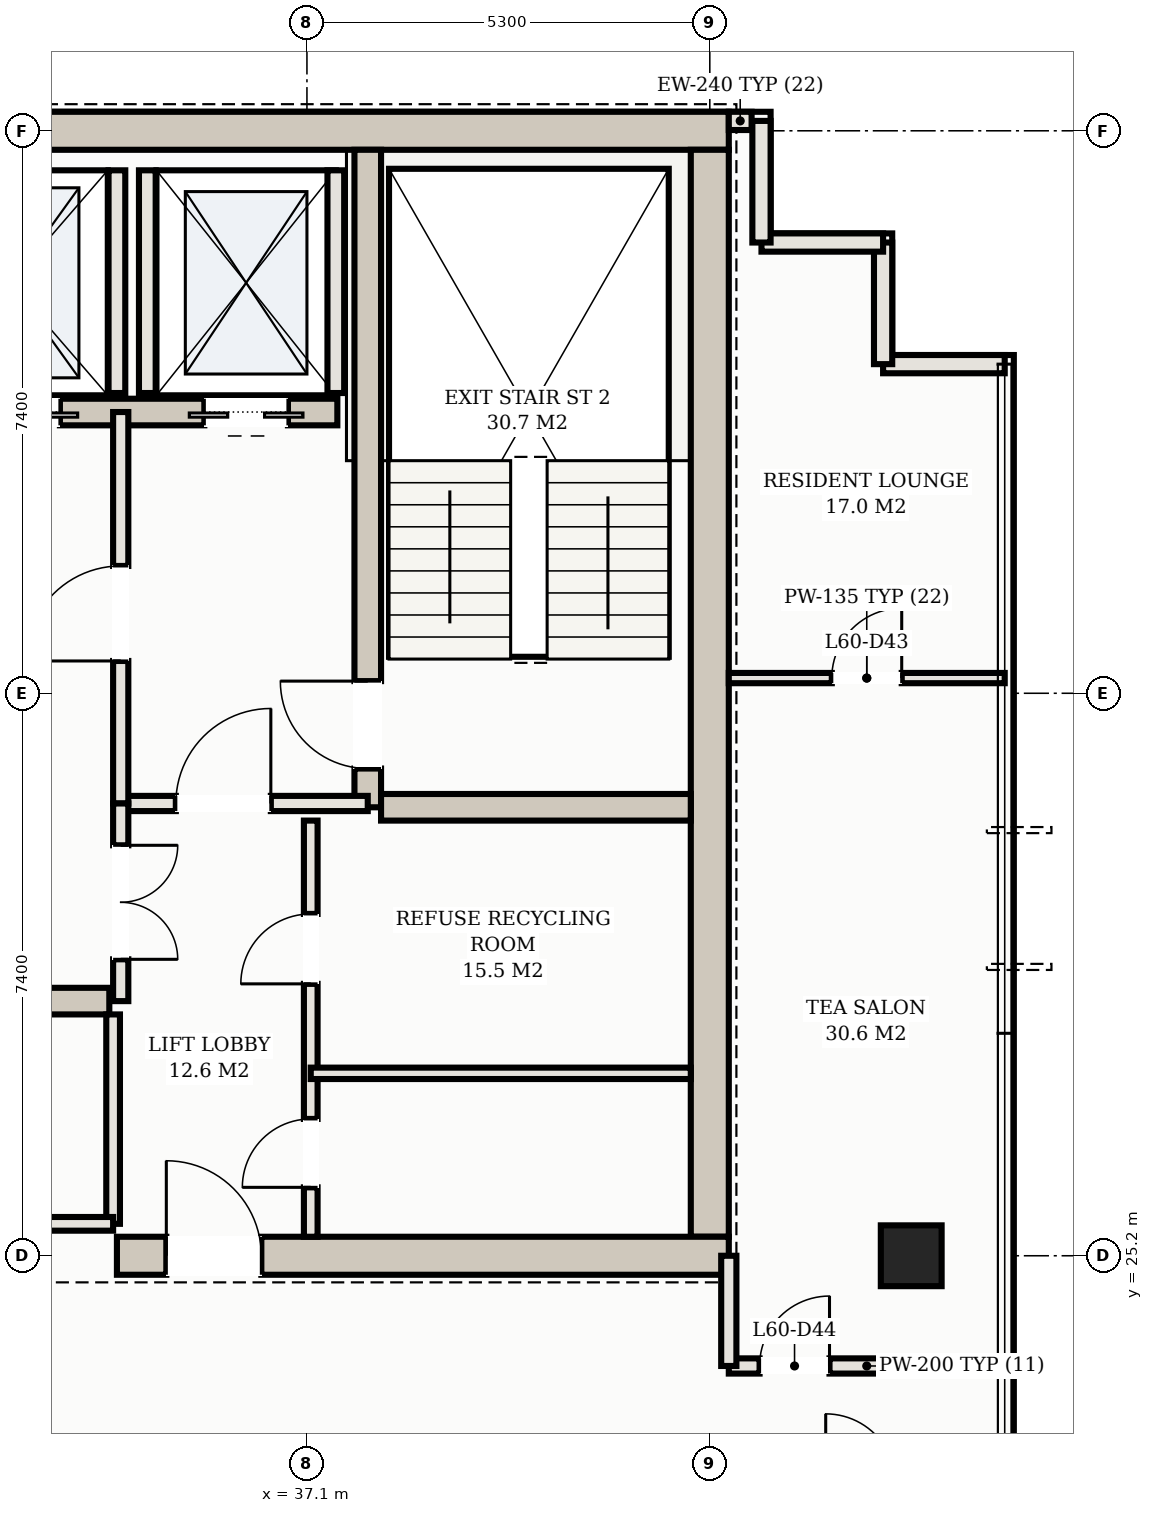
"""IFC4 building model, lengths in metres.
Left out: names, types, materials, properties, quantities, classifications, styles, units other than length and angle.
Written with IfcOpenShell. Run it as: python <this file> out.ifc"""

import sys

from ifc_helpers import new_model, si_unit, direction, frame, frame_2d, origin, origin_2d, place, context, subcontext, project, spatial, rectangle, hollow_rectangle, extrude, element, fill, save


model = new_model("IFC4")
c1 = context("Model", 3, precision=1e-05, world=origin(), true_north=direction((0.0, 1.0)))
c2 = subcontext(c1, "Body", "Model", "MODEL_VIEW")
j1 = project(units=[si_unit("LENGTHUNIT", "METRE"), si_unit("PLANEANGLEUNIT", "RADIAN")], contexts=[c1])
p1 = place(None, origin())
s1 = spatial("IfcSite", under=j1, at=p1, CompositionType="ELEMENT")
p2 = place(p1, origin())
s2 = spatial("IfcBuilding", under=s1, at=p2, CompositionType="ELEMENT")
p3 = place(p2, frame((0.0, 0.0, 219.8)))
s3 = spatial("IfcBuildingStorey", under=s2, at=p3, CompositionType="ELEMENT", Elevation=219.8)
p4 = place(p3, frame((10.35, 40.0, 0.0), z_axis=(0.0, 0.0, 1.0), x_axis=(1.0, 0.0, 0.0)))
e1 = element("IfcWall", 1, at=p4, inside=s3, PredefinedType="SHEAR", context=c2, shape_type="SweptSolid", body=[
    extrude(rectangle(XDim=32.3, YDim=0.5, at=frame_2d((16.15, 0.0))), origin(), (0.0, 0.0, 1.0), 3.11),
])
p5 = place(p3, frame((42.4, 25.45, 0.0), z_axis=(0.0, 0.0, 1.0), x_axis=(0.0, 1.0, 0.0)))
e2 = element("IfcWall", 2, at=p5, inside=s3, PredefinedType="SHEAR", context=c2, shape_type="SweptSolid", body=[
    extrude(rectangle(XDim=14.3, YDim=0.5, at=frame_2d((7.15, 0.0))), origin(), (0.0, 0.0, 1.0), 3.11),
])
p6 = place(p3, frame((34.6, 25.2, 0.0), z_axis=(0.0, 0.0, 1.0), x_axis=(1.0, 0.0, 0.0)))
e3 = element("IfcWall", 3, at=p6, inside=s3, PredefinedType="SHEAR", context=c2, shape_type="SweptSolid", body=[
    extrude(rectangle(XDim=8.05, YDim=0.5, at=frame_2d((4.025, 0.0))), origin(), (0.0, 0.0, 1.0), 3.11),
])
p7 = place(p6, frame((0.65, 0.0, 0.0)))
e4 = element("IfcOpeningElement", 4, at=p7, cuts=e3, PredefinedType="OPENING", context=c2, shape_type="SweptSolid", body=[
    extrude(rectangle(XDim=1.25, YDim=2.2, at=frame_2d((0.625, 1.1))), frame((0.0, 0.26, 0.0), z_axis=(0.0, -1.0, 0.0), x_axis=(1.0, 0.0, 0.0)), (0.0, 0.0, 1.0), 0.52),
])
p8 = place(p3, frame((37.9, 31.1, 0.0), z_axis=(0.0, 0.0, 1.0), x_axis=(0.0, 1.0, 0.0)))
e5 = element("IfcWall", 5, at=p8, inside=s3, PredefinedType="SHEAR", context=c2, shape_type="SweptSolid", body=[
    extrude(rectangle(XDim=8.65, YDim=0.35, at=frame_2d((4.325, 0.0))), origin(), (0.0, 0.0, 1.0), 3.11),
])
p9 = place(p8, frame((0.51, 0.0, 0.0)))
e6 = element("IfcOpeningElement", 6, at=p9, cuts=e5, PredefinedType="OPENING", context=c2, shape_type="SweptSolid", body=[
    extrude(rectangle(XDim=1.15, YDim=2.2, at=frame_2d((0.575, 1.1))), frame((0.0, 0.185, 0.0), z_axis=(0.0, -1.0, 0.0), x_axis=(1.0, 0.0, 0.0)), (0.0, 0.0, 1.0), 0.37),
])
p10 = place(p3, frame((38.075, 31.1, 0.0), z_axis=(0.0, 0.0, 1.0), x_axis=(1.0, 0.0, 0.0)))
e7 = element("IfcWall", 7, at=p10, inside=s3, PredefinedType="SHEAR", context=c2, shape_type="SweptSolid", body=[
    extrude(rectangle(XDim=4.075, YDim=0.35, at=frame_2d((2.038, 0.0))), origin(), (0.0, 0.0, 1.0), 3.11),
])
p11 = place(p3, frame((15.5, 36.3, 0.0), z_axis=(0.0, 0.0, 1.0), x_axis=(1.0, 0.0, 0.0)))
e8 = element("IfcWall", 8, at=p11, inside=s3, PredefinedType="SHEAR", context=c2, shape_type="SweptSolid", body=[
    extrude(rectangle(XDim=22.0, YDim=0.35, at=frame_2d((11.0, 0.0))), origin(), (0.0, 0.0, 1.0), 3.11),
])
p12 = place(p11, frame((0.65, 0.0, 0.0)))
e9 = element("IfcOpeningElement", 9, at=p12, cuts=e8, PredefinedType="OPENING", context=c2, shape_type="SweptSolid", body=[
    extrude(rectangle(XDim=1.1, YDim=2.15, at=frame_2d((0.55, 1.075))), frame((0.0, 0.185, 0.0), z_axis=(0.0, -1.0, 0.0), x_axis=(1.0, 0.0, 0.0)), (0.0, 0.0, 1.0), 0.37),
])
p13 = place(p11, frame((20.25, 0.0, 0.0)))
e10 = element("IfcOpeningElement", 10, at=p13, cuts=e8, PredefinedType="OPENING", context=c2, shape_type="SweptSolid", body=[
    extrude(rectangle(XDim=1.1, YDim=2.15, at=frame_2d((0.55, 1.075))), frame((0.0, 0.185, 0.0), z_axis=(0.0, -1.0, 0.0), x_axis=(1.0, 0.0, 0.0)), (0.0, 0.0, 1.0), 0.37),
])
p14 = place(p11, frame((17.05, 0.0, 0.0)))
e11 = element("IfcOpeningElement", 11, at=p14, cuts=e8, PredefinedType="OPENING", context=c2, shape_type="SweptSolid", body=[
    extrude(rectangle(XDim=1.3, YDim=2.2, at=frame_2d((0.65, 1.1))), frame((0.0, 0.185, 0.0), z_axis=(0.0, -1.0, 0.0), x_axis=(1.0, 0.0, 0.0)), (0.0, 0.0, 1.0), 0.37),
])
p15 = place(p11, frame((3.95, 0.0, 0.0)))
e12 = element("IfcOpeningElement", 12, at=p15, cuts=e8, PredefinedType="OPENING", context=c2, shape_type="SweptSolid", body=[
    extrude(rectangle(XDim=1.1, YDim=2.15, at=frame_2d((0.55, 1.075))), frame((0.0, 0.185, 0.0), z_axis=(0.0, -1.0, 0.0), x_axis=(1.0, 0.0, 0.0)), (0.0, 0.0, 1.0), 0.37),
])
p16 = place(p11, frame((6.55, 0.0, 0.0)))
e13 = element("IfcOpeningElement", 13, at=p16, cuts=e8, PredefinedType="OPENING", context=c2, shape_type="SweptSolid", body=[
    extrude(rectangle(XDim=1.1, YDim=2.15, at=frame_2d((0.55, 1.075))), frame((0.0, 0.185, 0.0), z_axis=(0.0, -1.0, 0.0), x_axis=(1.0, 0.0, 0.0)), (0.0, 0.0, 1.0), 0.37),
])
p17 = place(p11, frame((9.15, 0.0, 0.0)))
e14 = element("IfcOpeningElement", 14, at=p17, cuts=e8, PredefinedType="OPENING", context=c2, shape_type="SweptSolid", body=[
    extrude(rectangle(XDim=1.1, YDim=2.15, at=frame_2d((0.55, 1.075))), frame((0.0, 0.185, 0.0), z_axis=(0.0, -1.0, 0.0), x_axis=(1.0, 0.0, 0.0)), (0.0, 0.0, 1.0), 0.37),
])
p18 = place(p3, frame((18.5, 28.55, 0.0), z_axis=(0.0, 0.0, 1.0), x_axis=(1.0, 0.0, 0.0)))
e15 = element("IfcWall", 15, at=p18, inside=s3, PredefinedType="SHEAR", context=c2, shape_type="SweptSolid", body=[
    extrude(rectangle(XDim=16.0, YDim=0.35, at=frame_2d((8.0, 0.0))), origin(), (0.0, 0.0, 1.0), 3.11),
])
p19 = place(p3, frame((45.05, 25.2, 0.0), z_axis=(0.0, 0.0, 1.0), x_axis=(1.0, 0.0, 0.0)))
e16 = element("IfcColumn", 16, at=p19, inside=s3, PredefinedType="COLUMN", context=c2, shape_type="SweptSolid", body=[
    extrude(hollow_rectangle(XDim=0.8, YDim=0.8, WallThickness=0.028, at=origin_2d()), origin(), (0.0, 0.0, 1.0), 3.3),
])
for number, where, z_axis, x_axis in (
    (17, (35.0, 36.55, 0.0), (0.0, 0.0, 1.0), (0.0, 1.0, 0.0)),
    (18, (37.48, 36.55, 0.0), (0.0, 0.0, 1.0), (0.0, 1.0, 0.0)),
    (19, (34.6, 36.55, 0.0), (0.0, 0.0, 1.0), (0.0, 1.0, 0.0)),
):
    element("IfcWall", number, at=place(p3, frame(where, z_axis=z_axis, x_axis=x_axis)), inside=s3, PredefinedType="SOLIDWALL", context=c2, shape_type="SweptSolid", body=[
        extrude(rectangle(XDim=2.93, YDim=0.22, at=frame_2d((1.465, 0.0))), origin(), (0.0, 0.0, 1.0), 3.11),
    ])
for number, where, z_axis, x_axis in (
    (20, (46.28, 36.93, 0.0), (0.0, 0.0, 1.0), (-1.0, 0.0, 0.0)),
    (21, (44.68, 36.93, 0.0), (0.0, 0.0, 1.0), (0.0, 1.0, 0.0)),
):
    element("IfcWall", number, at=place(p3, frame(where, z_axis=z_axis, x_axis=x_axis)), inside=s3, PredefinedType="SOLIDWALL", context=c2, shape_type="SweptSolid", body=[
        extrude(rectangle(XDim=1.6, YDim=0.24, at=frame_2d((0.8, 0.0))), origin(), (0.0, 0.0, 1.0), 3.11),
    ])
for number, where, z_axis, x_axis in (
    (22, (44.68, 38.53, 0.0), (0.0, 0.0, 1.0), (-1.0, 0.0, 0.0)),
    (23, (43.08, 38.53, 0.0), (0.0, 0.0, 1.0), (0.0, 1.0, 0.0)),
):
    element("IfcWall", number, at=place(p3, frame(where, z_axis=z_axis, x_axis=x_axis)), inside=s3, PredefinedType="SOLIDWALL", context=c2, shape_type="SweptSolid", body=[
        extrude(rectangle(XDim=1.6, YDim=0.24, at=frame_2d((0.8, 0.0))), origin(), (0.0, 0.0, 1.0), 3.11),
    ])
p20 = place(p3, frame((42.95, 40.13, 0.0), z_axis=(0.0, 0.0, 1.0), x_axis=(-1.0, 0.0, 0.0)))
e24 = element("IfcWall", 24, at=p20, inside=s3, PredefinedType="SOLIDWALL", context=c2, shape_type="SweptSolid", body=[
    extrude(rectangle(XDim=0.3, YDim=0.24, at=frame_2d((0.15, 0.0))), origin(), (0.0, 0.0, 1.0), 3.11),
])
p21 = place(p3, frame((34.65, 31.15, 0.0), z_axis=(0.0, 0.0, 1.0), x_axis=(1.0, 0.0, 0.0)))
e25 = element("IfcWall", 25, at=p21, inside=s3, PredefinedType="PARTITIONING", context=c2, shape_type="SweptSolid", body=[
    extrude(rectangle(XDim=3.25, YDim=0.2, at=frame_2d((1.625, 0.0))), origin(), (0.0, 0.0, 1.0), 2.43),
])
p22 = place(p21, frame((0.725, 0.0, 0.0)))
e26 = element("IfcOpeningElement", 26, at=p22, cuts=e25, PredefinedType="OPENING", context=c2, shape_type="SweptSolid", body=[
    extrude(rectangle(XDim=1.25, YDim=2.2, at=frame_2d((0.625, 1.1))), frame((0.0, 0.11, 0.0), z_axis=(0.0, -1.0, 0.0), x_axis=(1.0, 0.0, 0.0)), (0.0, 0.0, 1.0), 0.22),
])
p23 = place(p3, frame((34.65, 31.15, 0.0), z_axis=(0.0, 0.0, 1.0), x_axis=(0.0, 1.0, 0.0)))
e27 = element("IfcWall", 27, at=p23, inside=s3, PredefinedType="PARTITIONING", context=c2, shape_type="SweptSolid", body=[
    extrude(rectangle(XDim=5.15, YDim=0.2, at=frame_2d((2.575, 0.0))), origin(), (0.0, 0.0, 1.0), 2.43),
])
p24 = place(p23, frame((1.875, 0.0, 0.0)))
e28 = element("IfcOpeningElement", 28, at=p24, cuts=e27, PredefinedType="OPENING", context=c2, shape_type="SweptSolid", body=[
    extrude(rectangle(XDim=1.25, YDim=2.2, at=frame_2d((0.625, 1.1))), frame((0.0, 0.11, 0.0), z_axis=(0.0, -1.0, 0.0), x_axis=(1.0, 0.0, 0.0)), (0.0, 0.0, 1.0), 0.22),
])
p25 = place(p3, frame((37.15, 25.45, 0.0), z_axis=(0.0, 0.0, 1.0), x_axis=(0.0, 1.0, 0.0)))
e29 = element("IfcWall", 29, at=p25, inside=s3, PredefinedType="PARTITIONING", context=c2, shape_type="SweptSolid", body=[
    extrude(rectangle(XDim=5.475, YDim=0.18, at=frame_2d((2.738, 0.0))), origin(), (0.0, 0.0, 1.0), 2.43),
])
p26 = place(p25, frame((0.65, 0.0, 0.0)))
e30 = element("IfcOpeningElement", 30, at=p26, cuts=e29, PredefinedType="OPENING", context=c2, shape_type="SweptSolid", body=[
    extrude(rectangle(XDim=0.9, YDim=2.15, at=frame_2d((0.45, 1.075))), frame((0.0, 0.1, 0.0), z_axis=(0.0, -1.0, 0.0), x_axis=(1.0, 0.0, 0.0)), (0.0, 0.0, 1.0), 0.2),
])
p27 = place(p25, frame((3.327, 0.0, 0.0)))
e31 = element("IfcOpeningElement", 31, at=p27, cuts=e29, PredefinedType="OPENING", context=c2, shape_type="SweptSolid", body=[
    extrude(rectangle(XDim=0.92, YDim=2.15, at=frame_2d((0.46, 1.075))), frame((0.0, 0.1, 0.0), z_axis=(0.0, -1.0, 0.0), x_axis=(1.0, 0.0, 0.0)), (0.0, 0.0, 1.0), 0.2),
])
p28 = place(p3, frame((37.15, 27.6, 0.0), z_axis=(0.0, 0.0, 1.0), x_axis=(1.0, 0.0, 0.0)))
e32 = element("IfcWall", 32, at=p28, inside=s3, PredefinedType="PARTITIONING", context=c2, shape_type="SweptSolid", body=[
    extrude(rectangle(XDim=5.0, YDim=0.15, at=frame_2d((2.5, 0.0))), origin(), (0.0, 0.0, 1.0), 2.43),
])
p29 = place(p3, frame((34.65, 28.55, 0.0), z_axis=(0.0, 0.0, 1.0), x_axis=(0.0, 1.0, 0.0)))
e33 = element("IfcWall", 33, at=p29, inside=s3, PredefinedType="PARTITIONING", context=c2, shape_type="SweptSolid", body=[
    extrude(rectangle(XDim=2.6, YDim=0.2, at=frame_2d((1.3, 0.0))), origin(), (0.0, 0.0, 1.0), 2.43),
])
p30 = place(p29, frame((0.55, 0.0, 0.0)))
e34 = element("IfcOpeningElement", 34, at=p30, cuts=e33, PredefinedType="OPENING", context=c2, shape_type="SweptSolid", body=[
    extrude(rectangle(XDim=1.5, YDim=2.25, at=frame_2d((0.75, 1.125))), frame((0.0, 0.11, 0.0), z_axis=(0.0, -1.0, 0.0), x_axis=(1.0, 0.0, 0.0)), (0.0, 0.0, 1.0), 0.22),
])
p31 = place(p3, frame((34.55, 25.62, 0.0), z_axis=(0.0, 0.0, 1.0), x_axis=(0.0, 1.0, 0.0)))
e35 = element("IfcWall", 35, at=p31, inside=s3, PredefinedType="PARTITIONING", context=c2, shape_type="SweptSolid", body=[
    extrude(rectangle(XDim=2.755, YDim=0.18, at=frame_2d((1.377, 0.0))), origin(), (0.0, 0.0, 1.0), 2.43),
])
p32 = place(p3, frame((26.65, 25.62, 0.0), z_axis=(0.0, 0.0, 1.0), x_axis=(1.0, 0.0, 0.0)))
e36 = element("IfcWall", 36, at=p32, inside=s3, PredefinedType="PARTITIONING", context=c2, shape_type="SweptSolid", body=[
    extrude(rectangle(XDim=7.9, YDim=0.18, at=frame_2d((3.95, 0.0))), origin(), (0.0, 0.0, 1.0), 2.43),
])
p33 = place(p32, frame((3.34, 0.0, 0.0)))
e37 = element("IfcOpeningElement", 37, at=p33, cuts=e36, PredefinedType="OPENING", context=c2, shape_type="SweptSolid", body=[
    extrude(rectangle(XDim=0.92, YDim=2.15, at=frame_2d((0.46, 1.075))), frame((0.0, 0.1, 0.0), z_axis=(0.0, -1.0, 0.0), x_axis=(1.0, 0.0, 0.0)), (0.0, 0.0, 1.0), 0.2),
])
p34 = place(p3, frame((42.65, 23.75, 0.0), z_axis=(0.0, 0.0, 1.0), x_axis=(1.0, 0.0, 0.0)))
e38 = element("IfcWall", 38, at=p34, inside=s3, PredefinedType="PARTITIONING", context=c2, shape_type="SweptSolid", body=[
    extrude(rectangle(XDim=3.63, YDim=0.2, at=frame_2d((1.815, 0.0))), origin(), (0.0, 0.0, 1.0), 2.43),
])
p35 = place(p34, frame((0.405, 0.0, 0.0)))
e39 = element("IfcOpeningElement", 39, at=p35, cuts=e38, PredefinedType="OPENING", context=c2, shape_type="SweptSolid", body=[
    extrude(rectangle(XDim=0.92, YDim=2.15, at=frame_2d((0.46, 1.075))), frame((0.0, 0.11, 0.0), z_axis=(0.0, -1.0, 0.0), x_axis=(1.0, 0.0, 0.0)), (0.0, 0.0, 1.0), 0.22),
])
p36 = place(p3, frame((42.65, 23.75, 0.0), z_axis=(0.0, 0.0, 1.0), x_axis=(0.0, 1.0, 0.0)))
e40 = element("IfcWall", 40, at=p36, inside=s3, PredefinedType="PARTITIONING", context=c2, shape_type="SweptSolid", body=[
    extrude(rectangle(XDim=1.45, YDim=0.2, at=frame_2d((0.725, 0.0))), origin(), (0.0, 0.0, 1.0), 2.43),
])
p37 = place(p3, frame((42.65, 32.8, 0.0), z_axis=(0.0, 0.0, 1.0), x_axis=(1.0, 0.0, 0.0)))
e41 = element("IfcWall", 41, at=p37, inside=s3, PredefinedType="PARTITIONING", context=c2, shape_type="SweptSolid", body=[
    extrude(rectangle(XDim=3.63, YDim=0.135, at=frame_2d((1.815, 0.0))), origin(), (0.0, 0.0, 1.0), 2.43),
])
p38 = place(p37, frame((1.355, 0.0, 0.0)))
e42 = element("IfcOpeningElement", 42, at=p38, cuts=e41, PredefinedType="OPENING", context=c2, shape_type="SweptSolid", body=[
    extrude(rectangle(XDim=0.92, YDim=2.15, at=frame_2d((0.46, 1.075))), frame((0.0, 0.078, 0.0), z_axis=(0.0, -1.0, 0.0), x_axis=(1.0, 0.0, 0.0)), (0.0, 0.0, 1.0), 0.155),
])
p39 = place(p13, frame((1.1, 0.0, 0.0), z_axis=(0.0, 0.0, 1.0), x_axis=(-1.0, 0.0, 0.0)))
e43 = element("IfcDoor", 43, at=p39, inside=s3, OperationType="DOUBLE_DOOR_SLIDING", PredefinedType="DOOR", context=c2, shape_type="SweptSolid", body=[
    extrude(rectangle(XDim=1.1, YDim=2.15, at=frame_2d((0.55, 1.075))), frame((0.0, 0.025, 0.0), z_axis=(0.0, -1.0, 0.0), x_axis=(1.0, 0.0, 0.0)), (0.0, 0.0, 1.0), 0.05),
])
fill(e10, e43)
p40 = place(p14, frame((1.3, 0.0, 0.0), z_axis=(0.0, 0.0, 1.0), x_axis=(-1.0, 0.0, 0.0)))
e44 = element("IfcDoor", 44, at=p40, inside=s3, OperationType="DOUBLE_DOOR_SLIDING", PredefinedType="DOOR", context=c2, shape_type="SweptSolid", body=[
    extrude(rectangle(XDim=1.3, YDim=2.2, at=frame_2d((0.65, 1.1))), frame((0.0, 0.025, 0.0), z_axis=(0.0, -1.0, 0.0), x_axis=(1.0, 0.0, 0.0)), (0.0, 0.0, 1.0), 0.05),
])
fill(e11, e44)
p41 = place(p7, origin())
e45 = element("IfcDoor", 45, at=p41, inside=s3, OperationType="SINGLE_SWING_LEFT", PredefinedType="DOOR", context=c2, shape_type="SweptSolid", body=[
    extrude(rectangle(XDim=1.25, YDim=2.2, at=frame_2d((0.625, 1.1))), frame((0.0, 0.025, 0.0), z_axis=(0.0, -1.0, 0.0), x_axis=(1.0, 0.0, 0.0)), (0.0, 0.0, 1.0), 0.05),
])
fill(e4, e45)
p42 = place(p22, origin())
e46 = element("IfcDoor", 46, at=p42, inside=s3, OperationType="SINGLE_SWING_RIGHT", PredefinedType="DOOR", context=c2, shape_type="SweptSolid", body=[
    extrude(rectangle(XDim=1.25, YDim=2.2, at=frame_2d((0.625, 1.1))), frame((0.0, 0.025, 0.0), z_axis=(0.0, -1.0, 0.0), x_axis=(1.0, 0.0, 0.0)), (0.0, 0.0, 1.0), 0.05),
])
fill(e26, e46)
p43 = place(p24, origin())
e47 = element("IfcDoor", 47, at=p43, inside=s3, OperationType="SINGLE_SWING_LEFT", PredefinedType="DOOR", context=c2, shape_type="SweptSolid", body=[
    extrude(rectangle(XDim=1.25, YDim=2.2, at=frame_2d((0.625, 1.1))), frame((0.0, 0.025, 0.0), z_axis=(0.0, -1.0, 0.0), x_axis=(1.0, 0.0, 0.0)), (0.0, 0.0, 1.0), 0.05),
])
fill(e28, e47)
p44 = place(p9, origin())
e48 = element("IfcDoor", 48, at=p44, inside=s3, OperationType="SINGLE_SWING_RIGHT", PredefinedType="DOOR", context=c2, shape_type="SweptSolid", body=[
    extrude(rectangle(XDim=1.15, YDim=2.2, at=frame_2d((0.575, 1.1))), frame((0.0, 0.025, 0.0), z_axis=(0.0, -1.0, 0.0), x_axis=(1.0, 0.0, 0.0)), (0.0, 0.0, 1.0), 0.05),
])
fill(e6, e48)
p45 = place(p26, origin())
e49 = element("IfcDoor", 49, at=p45, inside=s3, OperationType="SINGLE_SWING_LEFT", PredefinedType="DOOR", context=c2, shape_type="SweptSolid", body=[
    extrude(rectangle(XDim=0.9, YDim=2.15, at=frame_2d((0.45, 1.075))), frame((0.0, 0.025, 0.0), z_axis=(0.0, -1.0, 0.0), x_axis=(1.0, 0.0, 0.0)), (0.0, 0.0, 1.0), 0.05),
])
fill(e30, e49)
p46 = place(p27, origin())
e50 = element("IfcDoor", 50, at=p46, inside=s3, OperationType="SINGLE_SWING_LEFT", PredefinedType="DOOR", context=c2, shape_type="SweptSolid", body=[
    extrude(rectangle(XDim=0.92, YDim=2.15, at=frame_2d((0.46, 1.075))), frame((0.0, 0.025, 0.0), z_axis=(0.0, -1.0, 0.0), x_axis=(1.0, 0.0, 0.0)), (0.0, 0.0, 1.0), 0.05),
])
fill(e31, e50)
p47 = place(p30, frame((1.5, 0.0, 0.0), z_axis=(0.0, 0.0, 1.0), x_axis=(-1.0, 0.0, 0.0)))
e51 = element("IfcDoor", 51, at=p47, inside=s3, OperationType="DOUBLE_DOOR_SINGLE_SWING", PredefinedType="DOOR", context=c2, shape_type="SweptSolid", body=[
    extrude(rectangle(XDim=1.5, YDim=2.25, at=frame_2d((0.75, 1.125))), frame((0.0, 0.025, 0.0), z_axis=(0.0, -1.0, 0.0), x_axis=(1.0, 0.0, 0.0)), (0.0, 0.0, 1.0), 0.05),
])
fill(e34, e51)
p48 = place(p38, origin())
e52 = element("IfcDoor", 52, at=p48, inside=s3, OperationType="SINGLE_SWING_RIGHT", PredefinedType="DOOR", context=c2, shape_type="SweptSolid", body=[
    extrude(rectangle(XDim=0.92, YDim=2.15, at=frame_2d((0.46, 1.075))), frame((0.0, 0.025, 0.0), z_axis=(0.0, -1.0, 0.0), x_axis=(1.0, 0.0, 0.0)), (0.0, 0.0, 1.0), 0.05),
])
fill(e42, e52)
p49 = place(p35, origin())
e53 = element("IfcDoor", 53, at=p49, inside=s3, OperationType="SINGLE_SWING_RIGHT", PredefinedType="DOOR", context=c2, shape_type="SweptSolid", body=[
    extrude(rectangle(XDim=0.92, YDim=2.15, at=frame_2d((0.46, 1.075))), frame((0.0, 0.025, 0.0), z_axis=(0.0, -1.0, 0.0), x_axis=(1.0, 0.0, 0.0)), (0.0, 0.0, 1.0), 0.05),
])
fill(e39, e53)
save(model, sys.argv[1])
